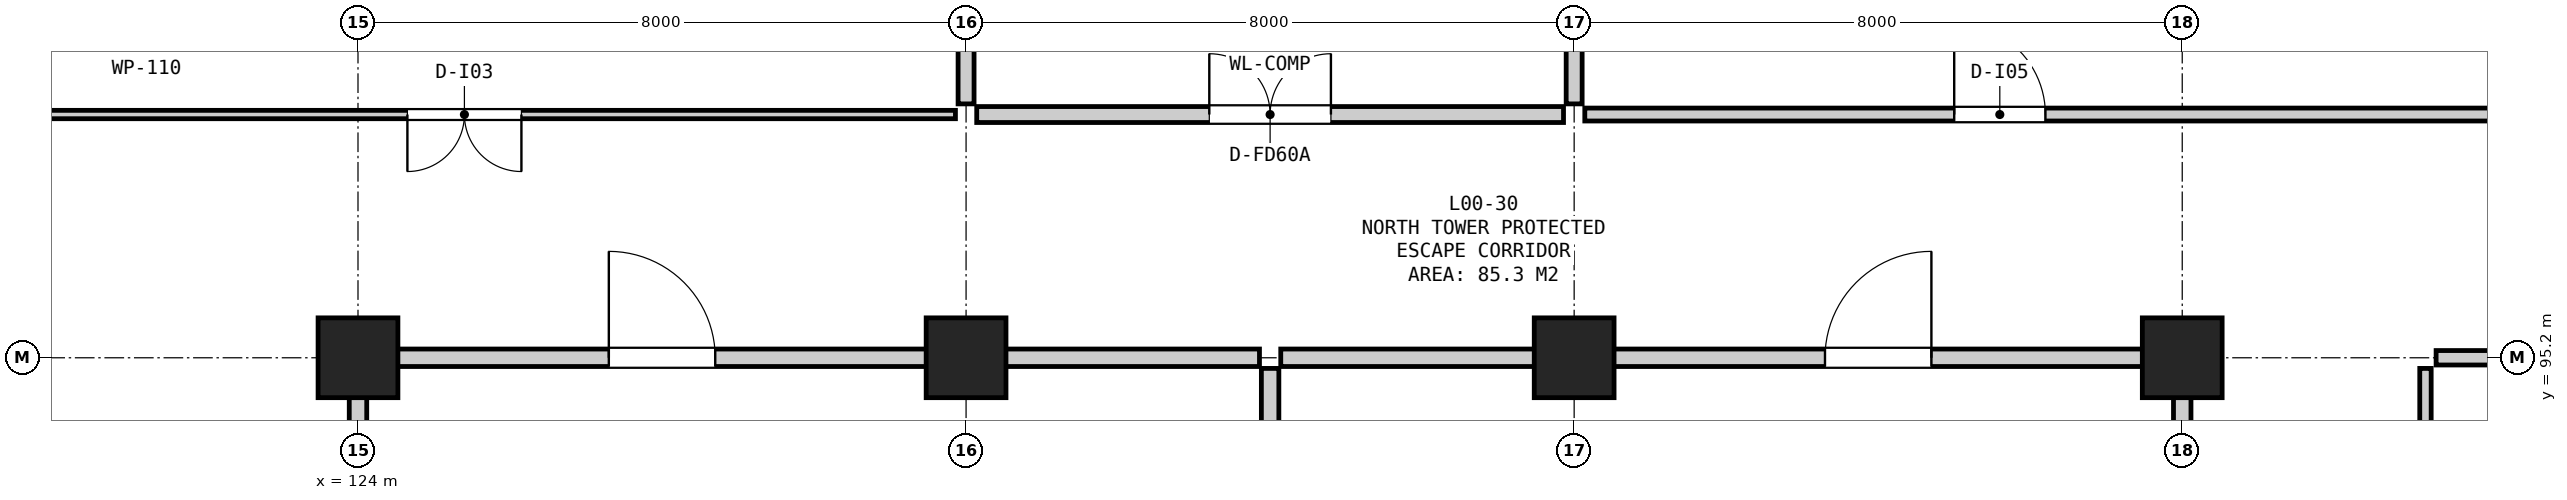
"""IFC4 building model, lengths in metres.
Left out: names, types, materials, properties, quantities, classifications, styles, units other than length and angle.
Written with IfcOpenShell. Run it as: python <this file> out.ifc"""

import sys

from ifc_helpers import new_model, si_unit, direction, frame, frame_2d, origin, origin_2d, place, context, subcontext, project, spatial, rectangle, extrude, element, fill, save


model = new_model("IFC4")
c1 = context("Model", 3, precision=1e-05, world=origin(), true_north=direction((0.0, 1.0)))
c2 = subcontext(c1, "Body", "Model", "MODEL_VIEW")
j1 = project(units=[si_unit("LENGTHUNIT", "METRE"), si_unit("PLANEANGLEUNIT", "RADIAN")], contexts=[c1])
p1 = place(None, origin())
s1 = spatial("IfcSite", under=j1, at=p1, CompositionType="ELEMENT")
p2 = place(p1, origin())
s2 = spatial("IfcBuilding", under=s1, at=p2, CompositionType="ELEMENT")
p3 = place(p2, origin())
s3 = spatial("IfcBuildingStorey", under=s2, at=p3, CompositionType="ELEMENT", Elevation=0.0)
for number, where, z_axis, x_axis in (
    (1, (124.0, 95.2, 0.0), (0.0, 0.0, 1.0), (1.0, 0.0, 0.0)),
    (2, (132.0, 95.2, 0.0), (0.0, 0.0, 1.0), (1.0, 0.0, 0.0)),
    (3, (140.0, 95.2, 0.0), (0.0, 0.0, 1.0), (1.0, 0.0, 0.0)),
    (4, (148.0, 95.2, 0.0), (0.0, 0.0, 1.0), (1.0, 0.0, 0.0)),
):
    element("IfcColumn", number, at=place(p3, frame(where, z_axis=z_axis, x_axis=x_axis)), inside=s3, PredefinedType="COLUMN", context=c2, shape_type="SweptSolid", body=[
        extrude(rectangle(XDim=1.05, YDim=1.05, at=origin_2d()), origin(), (0.0, 0.0, 1.0), 5.4),
    ])
p4 = place(p3, frame((124.14, 95.2, 0.0), z_axis=(0.0, 0.0, 1.0), x_axis=(1.0, 0.0, 0.0)))
e5 = element("IfcWall", 5, at=p4, inside=s3, PredefinedType="SOLIDWALL", context=c2, shape_type="SweptSolid", body=[
    extrude(rectangle(XDim=11.72, YDim=0.23, at=frame_2d((5.86, 0.0))), origin(), (0.0, 0.0, 1.0), 4.475),
])
p5 = place(p4, frame((3.16, 0.0, 0.0)))
e6 = element("IfcOpeningElement", 6, at=p5, cuts=e5, PredefinedType="OPENING", context=c2, shape_type="SweptSolid", body=[
    extrude(rectangle(XDim=1.4, YDim=2.2, at=frame_2d((0.7, 1.1))), frame((0.0, 0.127, 0.0), z_axis=(0.0, -1.0, 0.0), x_axis=(1.0, 0.0, 0.0)), (0.0, 0.0, 1.0), 0.254),
])
p6 = place(p3, frame((124.0, 91.54, 0.0), z_axis=(0.0, 0.0, 1.0), x_axis=(0.0, 1.0, 0.0)))
e7 = element("IfcWall", 7, at=p6, inside=s3, PredefinedType="SOLIDWALL", context=c2, shape_type="SweptSolid", body=[
    extrude(rectangle(XDim=3.52, YDim=0.23, at=frame_2d((1.76, 0.0))), origin(), (0.0, 0.0, 1.0), 4.525),
])
p7 = place(p3, frame((136.0, 91.54, 0.0), z_axis=(0.0, 0.0, 1.0), x_axis=(0.0, 1.0, 0.0)))
e8 = element("IfcWall", 8, at=p7, inside=s3, PredefinedType="SOLIDWALL", context=c2, shape_type="SweptSolid", body=[
    extrude(rectangle(XDim=3.52, YDim=0.23, at=frame_2d((1.76, 0.0))), origin(), (0.0, 0.0, 1.0), 5.08),
])
p8 = place(p3, frame((136.14, 95.2, 0.0), z_axis=(0.0, 0.0, 1.0), x_axis=(1.0, 0.0, 0.0)))
e9 = element("IfcWall", 9, at=p8, inside=s3, PredefinedType="SOLIDWALL", context=c2, shape_type="SweptSolid", body=[
    extrude(rectangle(XDim=11.72, YDim=0.23, at=frame_2d((5.86, 0.0))), origin(), (0.0, 0.0, 1.0), 4.525),
])
p9 = place(p8, frame((7.16, 0.0, 0.0)))
e10 = element("IfcOpeningElement", 10, at=p9, cuts=e9, PredefinedType="OPENING", context=c2, shape_type="SweptSolid", body=[
    extrude(rectangle(XDim=1.4, YDim=2.2, at=frame_2d((0.7, 1.1))), frame((0.0, 0.127, 0.0), z_axis=(0.0, -1.0, 0.0), x_axis=(1.0, 0.0, 0.0)), (0.0, 0.0, 1.0), 0.254),
])
p10 = place(p3, frame((148.0, 91.54, 0.0), z_axis=(0.0, 0.0, 1.0), x_axis=(0.0, 1.0, 0.0)))
e11 = element("IfcWall", 11, at=p10, inside=s3, PredefinedType="SOLIDWALL", context=c2, shape_type="SweptSolid", body=[
    extrude(rectangle(XDim=3.52, YDim=0.23, at=frame_2d((1.76, 0.0))), origin(), (0.0, 0.0, 1.0), 4.425),
])
p11 = place(p3, frame((132.14, 98.4, 0.0), z_axis=(0.0, 0.0, 1.0), x_axis=(1.0, 0.0, 0.0)))
e12 = element("IfcWall", 12, at=p11, inside=s3, PredefinedType="SOLIDWALL", context=c2, shape_type="SweptSolid", body=[
    extrude(rectangle(XDim=7.72, YDim=0.21, at=frame_2d((3.86, 0.0))), origin(), (0.0, 0.0, 1.0), 5.08),
])
p12 = place(p11, frame((3.06, 0.0, 0.0)))
e13 = element("IfcOpeningElement", 13, at=p12, cuts=e12, PredefinedType="OPENING", context=c2, shape_type="SweptSolid", body=[
    extrude(rectangle(XDim=1.6, YDim=2.2, at=frame_2d((0.8, 1.1))), frame((0.0, 0.117, 0.0), z_axis=(0.0, -1.0, 0.0), x_axis=(1.0, 0.0, 0.0)), (0.0, 0.0, 1.0), 0.234),
])
for number, where, z_axis, x_axis in (
    (14, (132.0, 98.54, 0.0), (0.0, 0.0, 1.0), (0.0, 1.0, 0.0)),
    (15, (140.0, 98.54, 0.0), (0.0, 0.0, 1.0), (0.0, 1.0, 0.0)),
):
    element("IfcWall", number, at=place(p3, frame(where, z_axis=z_axis, x_axis=x_axis)), inside=s3, PredefinedType="SOLIDWALL", context=c2, shape_type="SweptSolid", body=[
        extrude(rectangle(XDim=16.555, YDim=0.21, at=frame_2d((8.277, 0.0))), origin(), (0.0, 0.0, 1.0), 4.025),
    ])
p13 = place(p3, frame((151.34, 95.2, 0.0), z_axis=(0.0, 0.0, 1.0), x_axis=(1.0, 0.0, 0.0)))
e16 = element("IfcWall", 16, at=p13, inside=s3, PredefinedType="PARTITIONING", context=c2, shape_type="SweptSolid", body=[
    extrude(rectangle(XDim=16.555, YDim=0.19, at=frame_2d((8.277, 0.0))), origin(), (0.0, 0.0, 1.0), 4.025),
])
p14 = place(p3, frame((151.2, 76.0, 0.0), z_axis=(0.0, 0.0, 1.0), x_axis=(0.0, 1.0, 0.0)))
e17 = element("IfcWall", 17, at=p14, inside=s3, PredefinedType="PARTITIONING", context=c2, shape_type="SweptSolid", body=[
    extrude(rectangle(XDim=19.06, YDim=0.15, at=frame_2d((9.53, 0.0))), origin(), (0.0, 0.0, 1.0), 5.08),
])
p15 = place(p14, frame((10.6, 0.0, 0.0)))
e18 = element("IfcOpeningElement", 18, at=p15, cuts=e17, PredefinedType="OPENING", context=c2, shape_type="SweptSolid", body=[
    extrude(rectangle(XDim=1.2, YDim=2.15, at=frame_2d((0.6, 1.075))), frame((0.0, 0.087, 0.0), z_axis=(0.0, -1.0, 0.0), x_axis=(1.0, 0.0, 0.0)), (0.0, 0.0, 1.0), 0.174),
])
p16 = place(p3, frame((110.575, 98.4, 0.0), z_axis=(0.0, 0.0, 1.0), x_axis=(1.0, 0.0, 0.0)))
e19 = element("IfcWall", 19, at=p16, inside=s3, PredefinedType="PARTITIONING", context=c2, shape_type="SweptSolid", body=[
    extrude(rectangle(XDim=21.285, YDim=0.11, at=frame_2d((10.643, 0.0))), origin(), (0.0, 0.0, 1.0), 5.08),
])
p17 = place(p16, frame((14.075, 0.0, 0.0)))
e20 = element("IfcOpeningElement", 20, at=p17, cuts=e19, PredefinedType="OPENING", context=c2, shape_type="SweptSolid", body=[
    extrude(rectangle(XDim=1.5, YDim=2.2, at=frame_2d((0.75, 1.1))), frame((0.0, 0.067, 0.0), z_axis=(0.0, -1.0, 0.0), x_axis=(1.0, 0.0, 0.0)), (0.0, 0.0, 1.0), 0.134),
])
p18 = place(p3, frame((140.14, 98.4, 0.0), z_axis=(0.0, 0.0, 1.0), x_axis=(1.0, 0.0, 0.0)))
e21 = element("IfcWall", 21, at=p18, inside=s3, PredefinedType="PARTITIONING", context=c2, shape_type="SweptSolid", body=[
    extrude(rectangle(XDim=27.685, YDim=0.17, at=frame_2d((13.843, 0.0))), origin(), (0.0, 0.0, 1.0), 5.08),
])
p19 = place(p18, frame((4.86, 0.0, 0.0)))
e22 = element("IfcOpeningElement", 22, at=p19, cuts=e21, PredefinedType="OPENING", context=c2, shape_type="SweptSolid", body=[
    extrude(rectangle(XDim=1.2, YDim=2.15, at=frame_2d((0.6, 1.075))), frame((0.0, 0.097, 0.0), z_axis=(0.0, -1.0, 0.0), x_axis=(1.0, 0.0, 0.0)), (0.0, 0.0, 1.0), 0.194),
])
p20 = place(p5, origin())
e23 = element("IfcDoor", 23, at=p20, inside=s3, OperationType="SINGLE_SWING_LEFT", PredefinedType="DOOR", context=c2, shape_type="SweptSolid", body=[
    extrude(rectangle(XDim=1.4, YDim=2.2, at=frame_2d((0.7, 1.1))), frame((0.0, 0.025, 0.0), z_axis=(0.0, -1.0, 0.0), x_axis=(1.0, 0.0, 0.0)), (0.0, 0.0, 1.0), 0.05),
])
fill(e6, e23)
p21 = place(p9, origin())
e24 = element("IfcDoor", 24, at=p21, inside=s3, OperationType="SINGLE_SWING_RIGHT", PredefinedType="DOOR", context=c2, shape_type="SweptSolid", body=[
    extrude(rectangle(XDim=1.4, YDim=2.2, at=frame_2d((0.7, 1.1))), frame((0.0, 0.025, 0.0), z_axis=(0.0, -1.0, 0.0), x_axis=(1.0, 0.0, 0.0)), (0.0, 0.0, 1.0), 0.05),
])
fill(e10, e24)
p22 = place(p12, origin())
e25 = element("IfcDoor", 25, at=p22, inside=s3, OperationType="DOUBLE_DOOR_SINGLE_SWING", PredefinedType="DOOR", context=c2, shape_type="SweptSolid", body=[
    extrude(rectangle(XDim=1.6, YDim=2.2, at=frame_2d((0.8, 1.1))), frame((0.0, 0.025, 0.0), z_axis=(0.0, -1.0, 0.0), x_axis=(1.0, 0.0, 0.0)), (0.0, 0.0, 1.0), 0.05),
])
fill(e13, e25)
p23 = place(p17, frame((1.5, 0.0, 0.0), z_axis=(0.0, 0.0, 1.0), x_axis=(-1.0, 0.0, 0.0)))
e26 = element("IfcDoor", 26, at=p23, inside=s3, OperationType="DOUBLE_DOOR_SINGLE_SWING", PredefinedType="DOOR", context=c2, shape_type="SweptSolid", body=[
    extrude(rectangle(XDim=1.5, YDim=2.2, at=frame_2d((0.75, 1.1))), frame((0.0, 0.025, 0.0), z_axis=(0.0, -1.0, 0.0), x_axis=(1.0, 0.0, 0.0)), (0.0, 0.0, 1.0), 0.05),
])
fill(e20, e26)
p24 = place(p19, origin())
e27 = element("IfcDoor", 27, at=p24, inside=s3, OperationType="SINGLE_SWING_LEFT", PredefinedType="DOOR", context=c2, shape_type="SweptSolid", body=[
    extrude(rectangle(XDim=1.2, YDim=2.15, at=frame_2d((0.6, 1.075))), frame((0.0, 0.025, 0.0), z_axis=(0.0, -1.0, 0.0), x_axis=(1.0, 0.0, 0.0)), (0.0, 0.0, 1.0), 0.05),
])
fill(e22, e27)
save(model, sys.argv[1])
